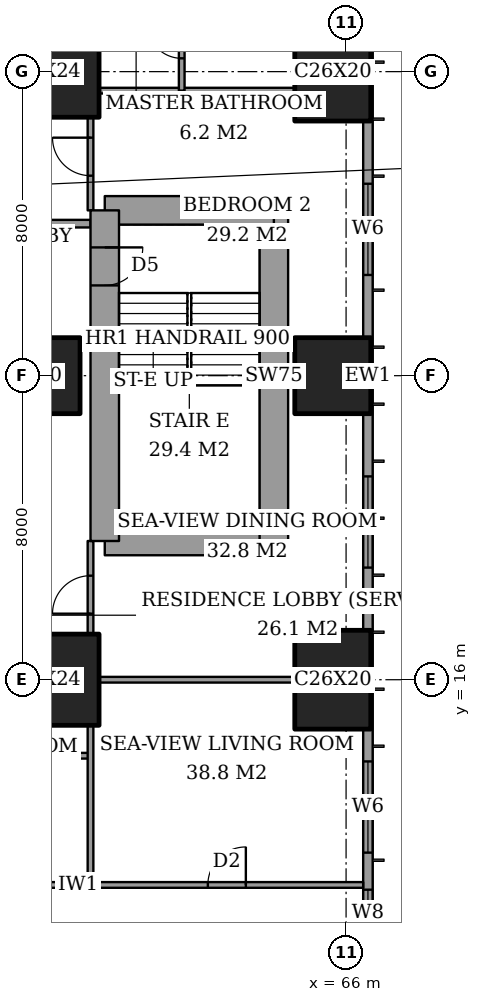
"""IFC4 building model, lengths in metres.
Left out: names, types, materials, properties, quantities, classifications, styles, units other than length and angle.
Written with IfcOpenShell. Run it as: python <this file> out.ifc"""

import sys

from ifc_helpers import new_model, si_unit, direction, frame, frame_2d, origin, origin_2d, place, context, subcontext, project, spatial, rectangle, extrude, element, fill, save


model = new_model("IFC4")
c1 = context("Model", 3, precision=1e-05, world=origin(), true_north=direction((0.0, 1.0)))
c2 = subcontext(c1, "Body", "Model", "MODEL_VIEW")
j1 = project(units=[si_unit("LENGTHUNIT", "METRE"), si_unit("PLANEANGLEUNIT", "RADIAN")], contexts=[c1])
p1 = place(None, origin())
s1 = spatial("IfcSite", under=j1, at=p1, CompositionType="ELEMENT")
p2 = place(p1, origin())
s2 = spatial("IfcBuilding", under=s1, at=p2, CompositionType="ELEMENT")
p3 = place(p2, frame((0.0, 0.0, 69.2)))
s3 = spatial("IfcBuildingStorey", under=s2, at=p3, CompositionType="ELEMENT", Elevation=69.2)
p4 = place(p3, frame((58.0, 16.0, 0.0), z_axis=(0.0, 0.0, 1.0), x_axis=(1.0, 0.0, 0.0)))
e1 = element("IfcColumn", 1, at=p4, inside=s3, PredefinedType="COLUMN", context=c2, shape_type="SweptSolid", body=[
    extrude(rectangle(XDim=3.0, YDim=2.4, at=origin_2d()), origin(), (0.0, 0.0, 1.0), 3.6),
])
p5 = place(p3, frame((58.0, 24.0, 0.0), z_axis=(0.0, 0.0, 1.0), x_axis=(1.0, 0.0, 0.0)))
e2 = element("IfcColumn", 2, at=p5, inside=s3, PredefinedType="COLUMN", context=c2, shape_type="SweptSolid", body=[
    extrude(rectangle(XDim=2.0, YDim=2.0, at=origin_2d()), origin(), (0.0, 0.0, 1.0), 3.6),
])
p6 = place(p3, frame((58.0, 32.0, 0.0), z_axis=(0.0, 0.0, 1.0), x_axis=(1.0, 0.0, 0.0)))
e3 = element("IfcColumn", 3, at=p6, inside=s3, PredefinedType="COLUMN", context=c2, shape_type="SweptSolid", body=[
    extrude(rectangle(XDim=3.0, YDim=2.4, at=origin_2d()), origin(), (0.0, 0.0, 1.0), 3.6),
])
p7 = place(p3, frame((65.65, 16.0, 0.0), z_axis=(0.0, 0.0, 1.0), x_axis=(0.0, 1.0, 0.0)))
e4 = element("IfcColumn", 4, at=p7, inside=s3, PredefinedType="COLUMN", context=c2, shape_type="SweptSolid", body=[
    extrude(rectangle(XDim=2.6, YDim=2.0, at=origin_2d()), origin(), (0.0, 0.0, 1.0), 3.6),
])
p8 = place(p3, frame((65.65, 24.0, 0.0), z_axis=(0.0, 0.0, 1.0), x_axis=(1.0, 0.0, 0.0)))
e5 = element("IfcColumn", 5, at=p8, inside=s3, PredefinedType="COLUMN", context=c2, shape_type="SweptSolid", body=[
    extrude(rectangle(XDim=2.0, YDim=2.0, at=origin_2d()), origin(), (0.0, 0.0, 1.0), 3.6),
])
p9 = place(p3, frame((65.65, 32.0, 0.0), z_axis=(0.0, 0.0, 1.0), x_axis=(0.0, 1.0, 0.0)))
e6 = element("IfcColumn", 6, at=p9, inside=s3, PredefinedType="COLUMN", context=c2, shape_type="SweptSolid", body=[
    extrude(rectangle(XDim=2.6, YDim=2.0, at=origin_2d()), origin(), (0.0, 0.0, 1.0), 3.6),
])
p10 = place(p3, frame((59.65, 19.65, 0.0), z_axis=(0.0, 0.0, 1.0), x_axis=(1.0, 0.0, 0.0)))
e7 = element("IfcWall", 7, at=p10, inside=s3, PredefinedType="SHEAR", context=c2, shape_type="SweptSolid", body=[
    extrude(rectangle(XDim=4.45, YDim=0.75, at=frame_2d((2.225, 0.0))), origin(), (0.0, 0.0, 1.0), 3.6),
])
p11 = place(p3, frame((64.1, 19.65, 0.0), z_axis=(0.0, 0.0, 1.0), x_axis=(0.0, 1.0, 0.0)))
e8 = element("IfcWall", 8, at=p11, inside=s3, PredefinedType="SHEAR", context=c2, shape_type="SweptSolid", body=[
    extrude(rectangle(XDim=8.7, YDim=0.75, at=frame_2d((4.35, 0.0))), origin(), (0.0, 0.0, 1.0), 3.6),
])
p12 = place(p3, frame((64.1, 28.35, 0.0), z_axis=(0.0, 0.0, 1.0), x_axis=(-1.0, 0.0, 0.0)))
e9 = element("IfcWall", 9, at=p12, inside=s3, PredefinedType="SHEAR", context=c2, shape_type="SweptSolid", body=[
    extrude(rectangle(XDim=4.45, YDim=0.75, at=frame_2d((2.225, 0.0))), origin(), (0.0, 0.0, 1.0), 3.6),
])
p13 = place(p3, frame((59.65, 28.35, 0.0), z_axis=(0.0, 0.0, 1.0), x_axis=(0.0, -1.0, 0.0)))
e10 = element("IfcWall", 10, at=p13, inside=s3, PredefinedType="SHEAR", context=c2, shape_type="SweptSolid", body=[
    extrude(rectangle(XDim=8.7, YDim=0.75, at=frame_2d((4.35, 0.0))), origin(), (0.0, 0.0, 1.0), 3.6),
])
p14 = place(p13, frame((0.975, 0.0, 0.0)))
e11 = element("IfcOpeningElement", 11, at=p14, cuts=e10, PredefinedType="OPENING", context=c2, shape_type="SweptSolid", body=[
    extrude(rectangle(XDim=1.0, YDim=2.1, at=frame_2d((0.5, 1.05))), frame((0.0, 0.385, 0.0), z_axis=(0.0, -1.0, 0.0), x_axis=(1.0, 0.0, 0.0)), (0.0, 0.0, 1.0), 0.77),
])
p15 = place(p3, frame((66.575, 3.175, 0.0), z_axis=(0.0, 0.0, 1.0), x_axis=(0.0, 1.0, 0.0)))
e12 = element("IfcWall", 12, at=p15, inside=s3, PredefinedType="SOLIDWALL", context=c2, shape_type="SweptSolid", body=[
    extrude(rectangle(XDim=41.65, YDim=0.25, at=frame_2d((20.825, 0.0))), origin(), (0.0, 0.0, 1.0), 3.6),
])
p16 = place(p15, frame((0.775, 0.0, 0.6)))
e13 = element("IfcOpeningElement", 13, at=p16, cuts=e12, PredefinedType="OPENING", context=c2, shape_type="SweptSolid", body=[
    extrude(rectangle(XDim=2.4, YDim=2.0, at=frame_2d((1.2, 1.0))), frame((0.0, 0.135, 0.0), z_axis=(0.0, -1.0, 0.0), x_axis=(1.0, 0.0, 0.0)), (0.0, 0.0, 1.0), 0.27),
])
p17 = place(p15, frame((6.1, 0.0, 0.6)))
e14 = element("IfcOpeningElement", 14, at=p17, cuts=e12, PredefinedType="OPENING", context=c2, shape_type="SweptSolid", body=[
    extrude(rectangle(XDim=1.2, YDim=2.0, at=frame_2d((0.6, 1.0))), frame((0.0, 0.135, 0.0), z_axis=(0.0, -1.0, 0.0), x_axis=(1.0, 0.0, 0.0)), (0.0, 0.0, 1.0), 0.27),
])
p18 = place(p15, frame((8.275, 0.0, 0.6)))
e15 = element("IfcOpeningElement", 15, at=p18, cuts=e12, PredefinedType="OPENING", context=c2, shape_type="SweptSolid", body=[
    extrude(rectangle(XDim=2.4, YDim=2.0, at=frame_2d((1.2, 1.0))), frame((0.0, 0.135, 0.0), z_axis=(0.0, -1.0, 0.0), x_axis=(1.0, 0.0, 0.0)), (0.0, 0.0, 1.0), 0.27),
])
p19 = place(p15, frame((15.775, 0.0, 0.6)))
e16 = element("IfcOpeningElement", 16, at=p19, cuts=e12, PredefinedType="OPENING", context=c2, shape_type="SweptSolid", body=[
    extrude(rectangle(XDim=2.4, YDim=2.0, at=frame_2d((1.2, 1.0))), frame((0.0, 0.135, 0.0), z_axis=(0.0, -1.0, 0.0), x_axis=(1.0, 0.0, 0.0)), (0.0, 0.0, 1.0), 0.27),
])
p20 = place(p15, frame((23.475, 0.0, 0.6)))
e17 = element("IfcOpeningElement", 17, at=p20, cuts=e12, PredefinedType="OPENING", context=c2, shape_type="SweptSolid", body=[
    extrude(rectangle(XDim=2.4, YDim=2.0, at=frame_2d((1.2, 1.0))), frame((0.0, 0.135, 0.0), z_axis=(0.0, -1.0, 0.0), x_axis=(1.0, 0.0, 0.0)), (0.0, 0.0, 1.0), 0.27),
])
p21 = place(p15, frame((30.975, 0.0, 0.6)))
e18 = element("IfcOpeningElement", 18, at=p21, cuts=e12, PredefinedType="OPENING", context=c2, shape_type="SweptSolid", body=[
    extrude(rectangle(XDim=2.4, YDim=2.0, at=frame_2d((1.2, 1.0))), frame((0.0, 0.135, 0.0), z_axis=(0.0, -1.0, 0.0), x_axis=(1.0, 0.0, 0.0)), (0.0, 0.0, 1.0), 0.27),
])
p22 = place(p15, frame((34.5, 0.0, 0.6)))
e19 = element("IfcOpeningElement", 19, at=p22, cuts=e12, PredefinedType="OPENING", context=c2, shape_type="SweptSolid", body=[
    extrude(rectangle(XDim=1.2, YDim=2.0, at=frame_2d((0.6, 1.0))), frame((0.0, 0.135, 0.0), z_axis=(0.0, -1.0, 0.0), x_axis=(1.0, 0.0, 0.0)), (0.0, 0.0, 1.0), 0.27),
])
p23 = place(p15, frame((38.475, 0.0, 0.6)))
e20 = element("IfcOpeningElement", 20, at=p23, cuts=e12, PredefinedType="OPENING", context=c2, shape_type="SweptSolid", body=[
    extrude(rectangle(XDim=2.4, YDim=2.0, at=frame_2d((1.2, 1.0))), frame((0.0, 0.135, 0.0), z_axis=(0.0, -1.0, 0.0), x_axis=(1.0, 0.0, 0.0)), (0.0, 0.0, 1.0), 0.27),
])
p24 = place(p3, frame((41.439, 10.6, 0.0), z_axis=(0.0, 0.0, 1.0), x_axis=(1.0, 0.0, 0.0)))
e21 = element("IfcWall", 21, at=p24, inside=s3, PredefinedType="PARTITIONING", context=c2, shape_type="SweptSolid", body=[
    extrude(rectangle(XDim=25.011, YDim=0.15, at=frame_2d((12.505, 0.0))), origin(), (0.0, 0.0, 1.0), 3.35),
])
p25 = place(p24, frame((10.761, 0.0, 0.0)))
e22 = element("IfcOpeningElement", 22, at=p25, cuts=e21, PredefinedType="OPENING", context=c2, shape_type="SweptSolid", body=[
    extrude(rectangle(XDim=1.0, YDim=2.1, at=frame_2d((0.5, 1.05))), frame((0.0, 0.085, 0.0), z_axis=(0.0, -1.0, 0.0), x_axis=(1.0, 0.0, 0.0)), (0.0, 0.0, 1.0), 0.17),
])
p26 = place(p24, frame((20.924, 0.0, 0.0)))
e23 = element("IfcOpeningElement", 23, at=p26, cuts=e21, PredefinedType="OPENING", context=c2, shape_type="SweptSolid", body=[
    extrude(rectangle(XDim=1.0, YDim=2.1, at=frame_2d((0.5, 1.05))), frame((0.0, 0.085, 0.0), z_axis=(0.0, -1.0, 0.0), x_axis=(1.0, 0.0, 0.0)), (0.0, 0.0, 1.0), 0.17),
])
p27 = place(p24, frame((15.749, 0.0, 0.0)))
e24 = element("IfcOpeningElement", 24, at=p27, cuts=e21, PredefinedType="OPENING", context=c2, shape_type="SweptSolid", body=[
    extrude(rectangle(XDim=0.9, YDim=2.1, at=frame_2d((0.45, 1.05))), frame((0.0, 0.085, 0.0), z_axis=(0.0, -1.0, 0.0), x_axis=(1.0, 0.0, 0.0)), (0.0, 0.0, 1.0), 0.17),
])
p28 = place(p24, frame((12.961, 0.0, 0.0)))
e25 = element("IfcOpeningElement", 25, at=p28, cuts=e21, PredefinedType="OPENING", context=c2, shape_type="SweptSolid", body=[
    extrude(rectangle(XDim=1.0, YDim=2.1, at=frame_2d((0.5, 1.05))), frame((0.0, 0.085, 0.0), z_axis=(0.0, -1.0, 0.0), x_axis=(1.0, 0.0, 0.0)), (0.0, 0.0, 1.0), 0.17),
])
p29 = place(p24, frame((7.861, 0.0, 0.0)))
e26 = element("IfcOpeningElement", 26, at=p29, cuts=e21, PredefinedType="OPENING", context=c2, shape_type="SweptSolid", body=[
    extrude(rectangle(XDim=1.0, YDim=2.1, at=frame_2d((0.5, 1.05))), frame((0.0, 0.085, 0.0), z_axis=(0.0, -1.0, 0.0), x_axis=(1.0, 0.0, 0.0)), (0.0, 0.0, 1.0), 0.17),
])
p30 = place(p24, frame((2.836, 0.0, 0.0)))
e27 = element("IfcOpeningElement", 27, at=p30, cuts=e21, PredefinedType="OPENING", context=c2, shape_type="SweptSolid", body=[
    extrude(rectangle(XDim=1.0, YDim=2.1, at=frame_2d((0.5, 1.05))), frame((0.0, 0.085, 0.0), z_axis=(0.0, -1.0, 0.0), x_axis=(1.0, 0.0, 0.0)), (0.0, 0.0, 1.0), 0.17),
])
p31 = place(p3, frame((56.0, 14.0, 0.0), z_axis=(0.0, 0.0, 1.0), x_axis=(1.0, 0.0, 0.0)))
e28 = element("IfcWall", 28, at=p31, inside=s3, PredefinedType="PARTITIONING", context=c2, shape_type="SweptSolid", body=[
    extrude(rectangle(XDim=3.275, YDim=0.15, at=frame_2d((1.637, 0.0))), origin(), (0.0, 0.0, 1.0), 3.35),
])
p32 = place(p3, frame((59.5, 16.0, 0.0), z_axis=(0.0, 0.0, 1.0), x_axis=(1.0, 0.0, 0.0)))
e29 = element("IfcWall", 29, at=p32, inside=s3, PredefinedType="PARTITIONING", context=c2, shape_type="SweptSolid", body=[
    extrude(rectangle(XDim=5.15, YDim=0.15, at=frame_2d((2.575, 0.0))), origin(), (0.0, 0.0, 1.0), 2.634),
])
p33 = place(p3, frame((42.0, 28.0, 0.0), z_axis=(0.0, 0.0, 1.0), x_axis=(1.0, 0.0, 0.0)))
e30 = element("IfcWall", 30, at=p33, inside=s3, PredefinedType="PARTITIONING", context=c2, shape_type="SweptSolid", body=[
    extrude(rectangle(XDim=17.275, YDim=0.2, at=frame_2d((8.637, 0.0))), origin(), (0.0, 0.0, 1.0), 3.35),
])
p34 = place(p33, frame((9.5, 0.0, 0.0)))
e31 = element("IfcOpeningElement", 31, at=p34, cuts=e30, PredefinedType="OPENING", context=c2, shape_type="SweptSolid", body=[
    extrude(rectangle(XDim=1.2, YDim=2.4, at=frame_2d((0.6, 1.2))), frame((0.0, 0.11, 0.0), z_axis=(0.0, -1.0, 0.0), x_axis=(1.0, 0.0, 0.0)), (0.0, 0.0, 1.0), 0.22),
])
p35 = place(p3, frame((59.5, 31.5, 0.0), z_axis=(0.0, 0.0, 1.0), x_axis=(1.0, 0.0, 0.0)))
e32 = element("IfcWall", 32, at=p35, inside=s3, PredefinedType="PARTITIONING", context=c2, shape_type="SweptSolid", body=[
    extrude(rectangle(XDim=5.15, YDim=0.15, at=frame_2d((2.575, 0.0))), origin(), (0.0, 0.0, 1.0), 3.35),
])
p36 = place(p3, frame((59.275, 10.6, 0.0), z_axis=(0.0, 0.0, 1.0), x_axis=(0.0, 1.0, 0.0)))
e33 = element("IfcWall", 33, at=p36, inside=s3, PredefinedType="PARTITIONING", context=c2, shape_type="SweptSolid", body=[
    extrude(rectangle(XDim=4.2, YDim=0.15, at=frame_2d((2.1, 0.0))), origin(), (0.0, 0.0, 1.0), 3.35),
])
p37 = place(p3, frame((59.275, 17.2, 0.0), z_axis=(0.0, 0.0, 1.0), x_axis=(0.0, 1.0, 0.0)))
e34 = element("IfcWall", 34, at=p37, inside=s3, PredefinedType="PARTITIONING", context=c2, shape_type="SweptSolid", body=[
    extrude(rectangle(XDim=2.45, YDim=0.15, at=frame_2d((1.225, 0.0))), origin(), (0.0, 0.0, 1.0), 3.35),
])
p38 = place(p37, frame((0.538, 0.0, 0.0)))
e35 = element("IfcOpeningElement", 35, at=p38, cuts=e34, PredefinedType="OPENING", context=c2, shape_type="SweptSolid", body=[
    extrude(rectangle(XDim=1.0, YDim=2.1, at=frame_2d((0.5, 1.05))), frame((0.0, 0.085, 0.0), z_axis=(0.0, -1.0, 0.0), x_axis=(1.0, 0.0, 0.0)), (0.0, 0.0, 1.0), 0.17),
])
p39 = place(p3, frame((59.275, 28.35, 0.0), z_axis=(0.0, 0.0, 1.0), x_axis=(0.0, 1.0, 0.0)))
e36 = element("IfcWall", 36, at=p39, inside=s3, PredefinedType="PARTITIONING", context=c2, shape_type="SweptSolid", body=[
    extrude(rectangle(XDim=2.45, YDim=0.15, at=frame_2d((1.225, 0.0))), origin(), (0.0, 0.0, 1.0), 3.35),
])
p40 = place(p39, frame((0.913, 0.0, 0.0)))
e37 = element("IfcOpeningElement", 37, at=p40, cuts=e36, PredefinedType="OPENING", context=c2, shape_type="SweptSolid", body=[
    extrude(rectangle(XDim=1.0, YDim=2.1, at=frame_2d((0.5, 1.05))), frame((0.0, 0.085, 0.0), z_axis=(0.0, -1.0, 0.0), x_axis=(1.0, 0.0, 0.0)), (0.0, 0.0, 1.0), 0.17),
])
p41 = place(p3, frame((61.675, 31.5, 0.0), z_axis=(0.0, 0.0, 1.0), x_axis=(0.0, 1.0, 0.0)))
e38 = element("IfcWall", 38, at=p41, inside=s3, PredefinedType="PARTITIONING", context=c2, shape_type="SweptSolid", body=[
    extrude(rectangle(XDim=2.6, YDim=0.15, at=frame_2d((1.3, 0.0))), origin(), (0.0, 0.0, 1.0), 3.35),
])
p42 = place(p41, frame((0.85, 0.0, 0.0)))
e39 = element("IfcOpeningElement", 39, at=p42, cuts=e38, PredefinedType="OPENING", context=c2, shape_type="SweptSolid", body=[
    extrude(rectangle(XDim=0.9, YDim=2.1, at=frame_2d((0.45, 1.05))), frame((0.0, 0.085, 0.0), z_axis=(0.0, -1.0, 0.0), x_axis=(1.0, 0.0, 0.0)), (0.0, 0.0, 1.0), 0.17),
])
p43 = place(p17, origin())
e40 = element("IfcWindow", 40, at=p43, inside=s3, PartitioningType="SINGLE_PANEL", PredefinedType="WINDOW", context=c2, shape_type="SweptSolid", body=[
    extrude(rectangle(XDim=1.2, YDim=2.0, at=frame_2d((0.6, 1.0))), frame((0.0, 0.03, 0.0), z_axis=(0.0, -1.0, 0.0), x_axis=(1.0, 0.0, 0.0)), (0.0, 0.0, 1.0), 0.06),
])
fill(e14, e40)
p44 = place(p18, origin())
e41 = element("IfcWindow", 41, at=p44, inside=s3, PartitioningType="SINGLE_PANEL", PredefinedType="WINDOW", context=c2, shape_type="SweptSolid", body=[
    extrude(rectangle(XDim=2.4, YDim=2.0, at=frame_2d((1.2, 1.0))), frame((0.0, 0.03, 0.0), z_axis=(0.0, -1.0, 0.0), x_axis=(1.0, 0.0, 0.0)), (0.0, 0.0, 1.0), 0.06),
])
fill(e15, e41)
p45 = place(p19, origin())
e42 = element("IfcWindow", 42, at=p45, inside=s3, PartitioningType="SINGLE_PANEL", PredefinedType="WINDOW", context=c2, shape_type="SweptSolid", body=[
    extrude(rectangle(XDim=2.4, YDim=2.0, at=frame_2d((1.2, 1.0))), frame((0.0, 0.03, 0.0), z_axis=(0.0, -1.0, 0.0), x_axis=(1.0, 0.0, 0.0)), (0.0, 0.0, 1.0), 0.06),
])
fill(e16, e42)
p46 = place(p20, origin())
e43 = element("IfcWindow", 43, at=p46, inside=s3, PartitioningType="SINGLE_PANEL", PredefinedType="WINDOW", context=c2, shape_type="SweptSolid", body=[
    extrude(rectangle(XDim=2.4, YDim=2.0, at=frame_2d((1.2, 1.0))), frame((0.0, 0.03, 0.0), z_axis=(0.0, -1.0, 0.0), x_axis=(1.0, 0.0, 0.0)), (0.0, 0.0, 1.0), 0.06),
])
fill(e17, e43)
p47 = place(p26, origin())
e44 = element("IfcDoor", 44, at=p47, inside=s3, OperationType="SINGLE_SWING_LEFT", PredefinedType="DOOR", context=c2, shape_type="SweptSolid", body=[
    extrude(rectangle(XDim=1.0, YDim=2.1, at=frame_2d((0.5, 1.05))), frame((0.0, 0.025, 0.0), z_axis=(0.0, -1.0, 0.0), x_axis=(1.0, 0.0, 0.0)), (0.0, 0.0, 1.0), 0.05),
])
fill(e23, e44)
p48 = place(p38, origin())
e45 = element("IfcDoor", 45, at=p48, inside=s3, OperationType="SINGLE_SWING_RIGHT", PredefinedType="DOOR", context=c2, shape_type="SweptSolid", body=[
    extrude(rectangle(XDim=1.0, YDim=2.1, at=frame_2d((0.5, 1.05))), frame((0.0, 0.025, 0.0), z_axis=(0.0, -1.0, 0.0), x_axis=(1.0, 0.0, 0.0)), (0.0, 0.0, 1.0), 0.05),
])
fill(e35, e45)
p49 = place(p42, origin())
e46 = element("IfcDoor", 46, at=p49, inside=s3, OperationType="SINGLE_SWING_LEFT", PredefinedType="DOOR", context=c2, shape_type="SweptSolid", body=[
    extrude(rectangle(XDim=0.9, YDim=2.1, at=frame_2d((0.45, 1.05))), frame((0.0, 0.025, 0.0), z_axis=(0.0, -1.0, 0.0), x_axis=(1.0, 0.0, 0.0)), (0.0, 0.0, 1.0), 0.05),
])
fill(e39, e46)
p50 = place(p40, origin())
e47 = element("IfcDoor", 47, at=p50, inside=s3, OperationType="SINGLE_SWING_LEFT", PredefinedType="DOOR", context=c2, shape_type="SweptSolid", body=[
    extrude(rectangle(XDim=1.0, YDim=2.1, at=frame_2d((0.5, 1.05))), frame((0.0, 0.025, 0.0), z_axis=(0.0, -1.0, 0.0), x_axis=(1.0, 0.0, 0.0)), (0.0, 0.0, 1.0), 0.05),
])
fill(e37, e47)
p51 = place(p14, origin())
e48 = element("IfcDoor", 48, at=p51, inside=s3, OperationType="SINGLE_SWING_RIGHT", PredefinedType="DOOR", context=c2, shape_type="SweptSolid", body=[
    extrude(rectangle(XDim=1.0, YDim=2.1, at=frame_2d((0.5, 1.05))), frame((0.0, 0.025, 0.0), z_axis=(0.0, -1.0, 0.0), x_axis=(1.0, 0.0, 0.0)), (0.0, 0.0, 1.0), 0.05),
])
fill(e11, e48)
save(model, sys.argv[1])
